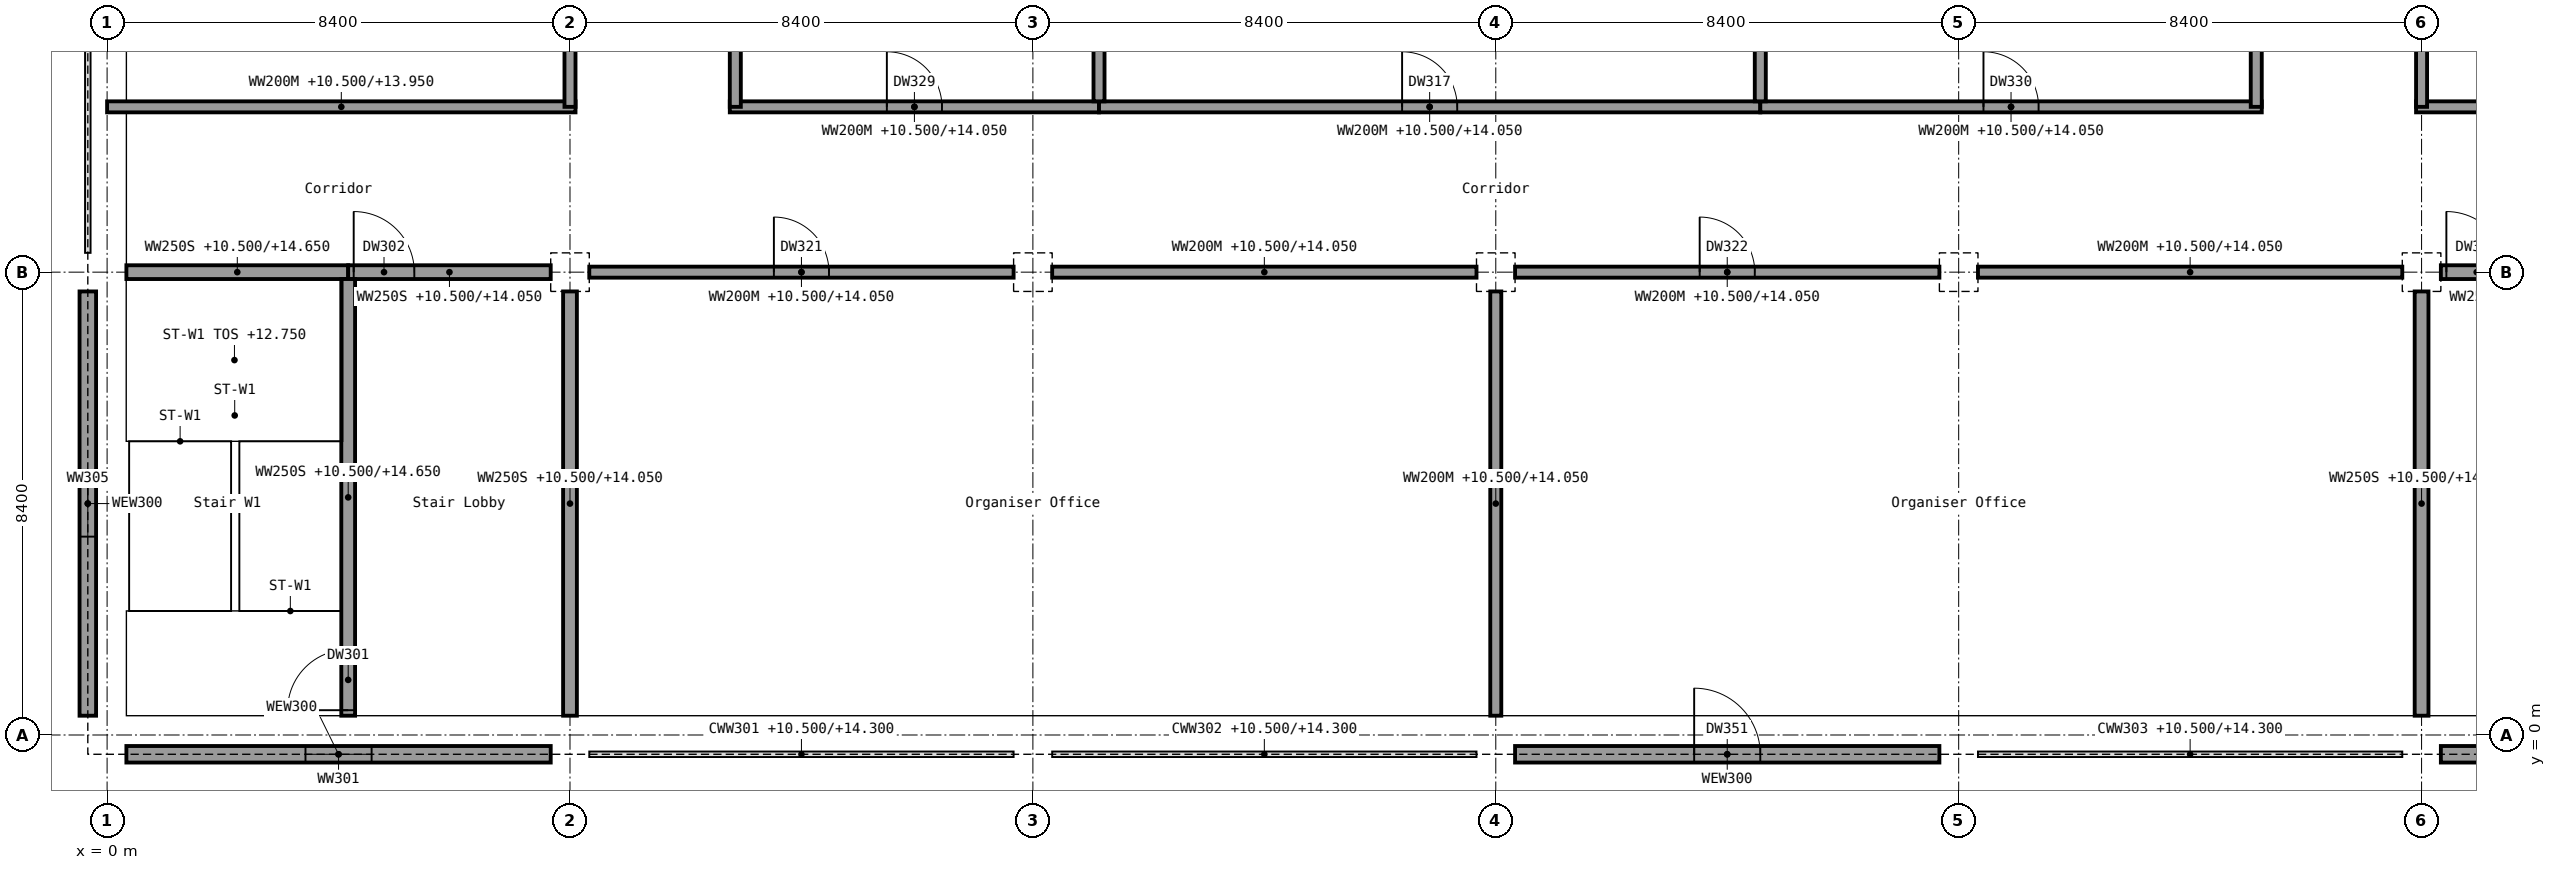
"""IFC4 building model, lengths in metres.
Left out: names, types, materials, properties, quantities, classifications, styles, units other than length and angle.
Written with IfcOpenShell. Run it as: python <this file> out.ifc"""

import sys

from ifc_helpers import new_model, si_unit, direction, frame, frame_2d, origin, origin_2d, place, context, subcontext, project, spatial, rectangle, extrude, element, fill, save


model = new_model("IFC4")
c1 = context("Model", 3, precision=1e-05, world=origin(), true_north=direction((0.0, 1.0)))
c2 = subcontext(c1, "Body", "Model", "MODEL_VIEW")
j1 = project(units=[si_unit("LENGTHUNIT", "METRE"), si_unit("PLANEANGLEUNIT", "RADIAN")], contexts=[c1])
p1 = place(None, origin())
s1 = spatial("IfcSite", under=j1, at=p1, CompositionType="ELEMENT")
p2 = place(p1, origin())
s2 = spatial("IfcBuilding", under=s1, at=p2, CompositionType="ELEMENT")
p3 = place(p2, frame((0.0, 0.0, 10.5)))
s3 = spatial("IfcBuildingStorey", under=s2, at=p3, CompositionType="ELEMENT", Elevation=10.5)
for number, where, z_axis, x_axis in (
    (1, (0.0, 0.0, 0.0), (0.0, 0.0, 1.0), (1.0, 0.0, 0.0)),
    (2, (0.0, 8.4, 0.0), (0.0, 0.0, 1.0), (1.0, 0.0, 0.0)),
    (3, (8.4, 0.0, 0.0), (0.0, 0.0, 1.0), (1.0, 0.0, 0.0)),
    (4, (8.4, 8.4, 0.0), (0.0, 0.0, 1.0), (1.0, 0.0, 0.0)),
    (5, (16.8, 0.0, 0.0), (0.0, 0.0, 1.0), (1.0, 0.0, 0.0)),
    (6, (16.8, 8.4, 0.0), (0.0, 0.0, 1.0), (1.0, 0.0, 0.0)),
    (7, (25.2, 0.0, 0.0), (0.0, 0.0, 1.0), (1.0, 0.0, 0.0)),
    (8, (25.2, 8.4, 0.0), (0.0, 0.0, 1.0), (1.0, 0.0, 0.0)),
    (9, (33.6, 0.0, 0.0), (0.0, 0.0, 1.0), (1.0, 0.0, 0.0)),
    (10, (33.6, 8.4, 0.0), (0.0, 0.0, 1.0), (1.0, 0.0, 0.0)),
    (11, (42.0, 0.0, 0.0), (0.0, 0.0, 1.0), (1.0, 0.0, 0.0)),
    (12, (42.0, 8.4, 0.0), (0.0, 0.0, 1.0), (1.0, 0.0, 0.0)),
):
    element("IfcColumn", number, at=place(p3, frame(where, z_axis=z_axis, x_axis=x_axis)), inside=s3, PredefinedType="COLUMN", context=c2, shape_type="SweptSolid", body=[
        extrude(rectangle(XDim=0.7, YDim=0.7, at=origin_2d()), origin(), (0.0, 0.0, 1.0), 4.5),
    ])
p4 = place(p3, frame((0.35, -0.35, 0.0), z_axis=(0.0, 0.0, 1.0), x_axis=(1.0, 0.0, 0.0)))
e13 = element("IfcWall", 13, at=p4, inside=s3, PredefinedType="SOLIDWALL", context=c2, shape_type="SweptSolid", body=[
    extrude(rectangle(XDim=7.7, YDim=0.3, at=frame_2d((3.85, 0.0))), origin(), (0.0, 0.0, 1.0), 3.8),
])
p5 = place(p4, frame((3.25, 0.0, 1.0)))
e14 = element("IfcOpeningElement", 14, at=p5, cuts=e13, PredefinedType="OPENING", context=c2, shape_type="SweptSolid", body=[
    extrude(rectangle(XDim=1.2, YDim=1.5, at=frame_2d((0.6, 0.75))), frame((0.0, 0.15, 0.0), z_axis=(0.0, -1.0, 0.0), x_axis=(1.0, 0.0, 0.0)), (0.0, 0.0, 1.0), 0.3),
])
p6 = place(p3, frame((25.55, -0.35, 0.0), z_axis=(0.0, 0.0, 1.0), x_axis=(1.0, 0.0, 0.0)))
e15 = element("IfcWall", 15, at=p6, inside=s3, PredefinedType="SOLIDWALL", context=c2, shape_type="SweptSolid", body=[
    extrude(rectangle(XDim=7.7, YDim=0.3, at=frame_2d((3.85, 0.0))), origin(), (0.0, 0.0, 1.0), 3.8),
])
p7 = place(p6, frame((3.25, 0.0, 0.0)))
e16 = element("IfcOpeningElement", 16, at=p7, cuts=e15, PredefinedType="OPENING", context=c2, shape_type="SweptSolid", body=[
    extrude(rectangle(XDim=1.2, YDim=2.1, at=frame_2d((0.6, 1.05))), frame((0.0, 0.15, 0.0), z_axis=(0.0, -1.0, 0.0), x_axis=(1.0, 0.0, 0.0)), (0.0, 0.0, 1.0), 0.3),
])
p8 = place(p3, frame((42.35, -0.35, 0.0), z_axis=(0.0, 0.0, 1.0), x_axis=(1.0, 0.0, 0.0)))
e17 = element("IfcWall", 17, at=p8, inside=s3, PredefinedType="SOLIDWALL", context=c2, shape_type="SweptSolid", body=[
    extrude(rectangle(XDim=7.7, YDim=0.3, at=frame_2d((3.85, 0.0))), origin(), (0.0, 0.0, 1.0), 3.8),
])
p9 = place(p8, frame((3.25, 0.0, 1.0)))
e18 = element("IfcOpeningElement", 18, at=p9, cuts=e17, PredefinedType="OPENING", context=c2, shape_type="SweptSolid", body=[
    extrude(rectangle(XDim=1.2, YDim=1.5, at=frame_2d((0.6, 0.75))), frame((0.0, 0.15, 0.0), z_axis=(0.0, -1.0, 0.0), x_axis=(1.0, 0.0, 0.0)), (0.0, 0.0, 1.0), 0.3),
])
p10 = place(p3, frame((-0.35, 0.35, 0.0), z_axis=(0.0, 0.0, 1.0), x_axis=(0.0, 1.0, 0.0)))
e19 = element("IfcWall", 19, at=p10, inside=s3, PredefinedType="SOLIDWALL", context=c2, shape_type="SweptSolid", body=[
    extrude(rectangle(XDim=7.7, YDim=0.3, at=frame_2d((3.85, 0.0))), origin(), (0.0, 0.0, 1.0), 3.8),
])
p11 = place(p10, frame((3.25, 0.0, 1.0)))
e20 = element("IfcOpeningElement", 20, at=p11, cuts=e19, PredefinedType="OPENING", context=c2, shape_type="SweptSolid", body=[
    extrude(rectangle(XDim=1.2, YDim=1.5, at=frame_2d((0.6, 0.75))), frame((0.0, 0.15, 0.0), z_axis=(0.0, -1.0, 0.0), x_axis=(1.0, 0.0, 0.0)), (0.0, 0.0, 1.0), 0.3),
])
p12 = place(p3, frame((0.35, 8.4, 0.0), z_axis=(0.0, 0.0, 1.0), x_axis=(1.0, 0.0, 0.0)))
e21 = element("IfcWall", 21, at=p12, inside=s3, PredefinedType="SHEAR", context=c2, shape_type="SweptSolid", body=[
    extrude(rectangle(XDim=4.025, YDim=0.25, at=frame_2d((2.012, 0.0))), origin(), (0.0, 0.0, 1.0), 4.15),
])
p13 = place(p3, frame((4.375, 8.4, 0.0), z_axis=(0.0, 0.0, 1.0), x_axis=(1.0, 0.0, 0.0)))
e22 = element("IfcWall", 22, at=p13, inside=s3, PredefinedType="SHEAR", context=c2, shape_type="SweptSolid", body=[
    extrude(rectangle(XDim=3.675, YDim=0.25, at=frame_2d((1.837, 0.0))), origin(), (0.0, 0.0, 1.0), 3.55),
])
p14 = place(p13, frame((0.1, 0.0, 0.0)))
e23 = element("IfcOpeningElement", 23, at=p14, cuts=e22, PredefinedType="OPENING", context=c2, shape_type="SweptSolid", body=[
    extrude(rectangle(XDim=1.1, YDim=2.1, at=frame_2d((0.55, 1.05))), frame((0.0, 0.125, 0.0), z_axis=(0.0, -1.0, 0.0), x_axis=(1.0, 0.0, 0.0)), (0.0, 0.0, 1.0), 0.25),
])
p15 = place(p3, frame((8.75, 8.4, 0.0), z_axis=(0.0, 0.0, 1.0), x_axis=(1.0, 0.0, 0.0)))
e24 = element("IfcWall", 24, at=p15, inside=s3, PredefinedType="PARTITIONING", context=c2, shape_type="SweptSolid", body=[
    extrude(rectangle(XDim=7.7, YDim=0.2, at=frame_2d((3.85, 0.0))), origin(), (0.0, 0.0, 1.0), 3.55),
])
p16 = place(p15, frame((3.35, 0.0, 0.0)))
e25 = element("IfcOpeningElement", 25, at=p16, cuts=e24, PredefinedType="OPENING", context=c2, shape_type="SweptSolid", body=[
    extrude(rectangle(XDim=1.0, YDim=2.1, at=frame_2d((0.5, 1.05))), frame((0.0, 0.1, 0.0), z_axis=(0.0, -1.0, 0.0), x_axis=(1.0, 0.0, 0.0)), (0.0, 0.0, 1.0), 0.2),
])
p17 = place(p3, frame((17.15, 8.4, 0.0), z_axis=(0.0, 0.0, 1.0), x_axis=(1.0, 0.0, 0.0)))
e26 = element("IfcWall", 26, at=p17, inside=s3, PredefinedType="PARTITIONING", context=c2, shape_type="SweptSolid", body=[
    extrude(rectangle(XDim=7.7, YDim=0.2, at=frame_2d((3.85, 0.0))), origin(), (0.0, 0.0, 1.0), 3.55),
])
p18 = place(p3, frame((25.55, 8.4, 0.0), z_axis=(0.0, 0.0, 1.0), x_axis=(1.0, 0.0, 0.0)))
e27 = element("IfcWall", 27, at=p18, inside=s3, PredefinedType="PARTITIONING", context=c2, shape_type="SweptSolid", body=[
    extrude(rectangle(XDim=7.7, YDim=0.2, at=frame_2d((3.85, 0.0))), origin(), (0.0, 0.0, 1.0), 3.55),
])
p19 = place(p18, frame((3.35, 0.0, 0.0)))
e28 = element("IfcOpeningElement", 28, at=p19, cuts=e27, PredefinedType="OPENING", context=c2, shape_type="SweptSolid", body=[
    extrude(rectangle(XDim=1.0, YDim=2.1, at=frame_2d((0.5, 1.05))), frame((0.0, 0.1, 0.0), z_axis=(0.0, -1.0, 0.0), x_axis=(1.0, 0.0, 0.0)), (0.0, 0.0, 1.0), 0.2),
])
p20 = place(p3, frame((33.95, 8.4, 0.0), z_axis=(0.0, 0.0, 1.0), x_axis=(1.0, 0.0, 0.0)))
e29 = element("IfcWall", 29, at=p20, inside=s3, PredefinedType="PARTITIONING", context=c2, shape_type="SweptSolid", body=[
    extrude(rectangle(XDim=7.7, YDim=0.2, at=frame_2d((3.85, 0.0))), origin(), (0.0, 0.0, 1.0), 3.55),
])
p21 = place(p3, frame((42.35, 8.4, 0.0), z_axis=(0.0, 0.0, 1.0), x_axis=(1.0, 0.0, 0.0)))
e30 = element("IfcWall", 30, at=p21, inside=s3, PredefinedType="SHEAR", context=c2, shape_type="SweptSolid", body=[
    extrude(rectangle(XDim=3.675, YDim=0.25, at=frame_2d((1.837, 0.0))), origin(), (0.0, 0.0, 1.0), 3.55),
])
p22 = place(p21, frame((0.1, 0.0, 0.0)))
e31 = element("IfcOpeningElement", 31, at=p22, cuts=e30, PredefinedType="OPENING", context=c2, shape_type="SweptSolid", body=[
    extrude(rectangle(XDim=1.1, YDim=2.1, at=frame_2d((0.55, 1.05))), frame((0.0, 0.125, 0.0), z_axis=(0.0, -1.0, 0.0), x_axis=(1.0, 0.0, 0.0)), (0.0, 0.0, 1.0), 0.25),
])
p23 = place(p3, frame((0.0, 11.4, 0.0), z_axis=(0.0, 0.0, 1.0), x_axis=(1.0, 0.0, 0.0)))
e32 = element("IfcWall", 32, at=p23, inside=s3, PredefinedType="PARTITIONING", context=c2, shape_type="SweptSolid", body=[
    extrude(rectangle(XDim=8.5, YDim=0.2, at=frame_2d((4.25, 0.0))), origin(), (0.0, 0.0, 1.0), 3.45),
])
p24 = place(p3, frame((11.3, 11.4, 0.0), z_axis=(0.0, 0.0, 1.0), x_axis=(1.0, 0.0, 0.0)))
e33 = element("IfcWall", 33, at=p24, inside=s3, PredefinedType="PARTITIONING", context=c2, shape_type="SweptSolid", body=[
    extrude(rectangle(XDim=6.7, YDim=0.2, at=frame_2d((3.35, 0.0))), origin(), (0.0, 0.0, 1.0), 3.55),
])
p25 = place(p24, frame((2.85, 0.0, 0.0)))
e34 = element("IfcOpeningElement", 34, at=p25, cuts=e33, PredefinedType="OPENING", context=c2, shape_type="SweptSolid", body=[
    extrude(rectangle(XDim=1.0, YDim=2.1, at=frame_2d((0.5, 1.05))), frame((0.0, 0.1, 0.0), z_axis=(0.0, -1.0, 0.0), x_axis=(1.0, 0.0, 0.0)), (0.0, 0.0, 1.0), 0.2),
])
p26 = place(p3, frame((18.0, 11.4, 0.0), z_axis=(0.0, 0.0, 1.0), x_axis=(1.0, 0.0, 0.0)))
e35 = element("IfcWall", 35, at=p26, inside=s3, PredefinedType="PARTITIONING", context=c2, shape_type="SweptSolid", body=[
    extrude(rectangle(XDim=12.0, YDim=0.2, at=frame_2d((6.0, 0.0))), origin(), (0.0, 0.0, 1.0), 3.55),
])
p27 = place(p26, frame((5.5, 0.0, 0.0)))
e36 = element("IfcOpeningElement", 36, at=p27, cuts=e35, PredefinedType="OPENING", context=c2, shape_type="SweptSolid", body=[
    extrude(rectangle(XDim=1.0, YDim=2.1, at=frame_2d((0.5, 1.05))), frame((0.0, 0.1, 0.0), z_axis=(0.0, -1.0, 0.0), x_axis=(1.0, 0.0, 0.0)), (0.0, 0.0, 1.0), 0.2),
])
p28 = place(p3, frame((30.0, 11.4, 0.0), z_axis=(0.0, 0.0, 1.0), x_axis=(1.0, 0.0, 0.0)))
e37 = element("IfcWall", 37, at=p28, inside=s3, PredefinedType="PARTITIONING", context=c2, shape_type="SweptSolid", body=[
    extrude(rectangle(XDim=9.1, YDim=0.2, at=frame_2d((4.55, 0.0))), origin(), (0.0, 0.0, 1.0), 3.55),
])
p29 = place(p28, frame((4.05, 0.0, 0.0)))
e38 = element("IfcOpeningElement", 38, at=p29, cuts=e37, PredefinedType="OPENING", context=c2, shape_type="SweptSolid", body=[
    extrude(rectangle(XDim=1.0, YDim=2.1, at=frame_2d((0.5, 1.05))), frame((0.0, 0.1, 0.0), z_axis=(0.0, -1.0, 0.0), x_axis=(1.0, 0.0, 0.0)), (0.0, 0.0, 1.0), 0.2),
])
p30 = place(p3, frame((41.9, 11.4, 0.0), z_axis=(0.0, 0.0, 1.0), x_axis=(1.0, 0.0, 0.0)))
e39 = element("IfcWall", 39, at=p30, inside=s3, PredefinedType="PARTITIONING", context=c2, shape_type="SweptSolid", body=[
    extrude(rectangle(XDim=8.5, YDim=0.2, at=frame_2d((4.25, 0.0))), origin(), (0.0, 0.0, 1.0), 3.45),
])
p31 = place(p3, frame((4.375, 0.35, 0.0), z_axis=(0.0, 0.0, 1.0), x_axis=(0.0, 1.0, 0.0)))
e40 = element("IfcWall", 40, at=p31, inside=s3, PredefinedType="SHEAR", context=c2, shape_type="SweptSolid", body=[
    extrude(rectangle(XDim=7.925, YDim=0.25, at=frame_2d((3.962, 0.0))), origin(), (0.0, 0.0, 1.0), 4.15),
])
p32 = place(p31, frame((0.1, 0.0, 0.0)))
e41 = element("IfcOpeningElement", 41, at=p32, cuts=e40, PredefinedType="OPENING", context=c2, shape_type="SweptSolid", body=[
    extrude(rectangle(XDim=1.1, YDim=2.1, at=frame_2d((0.55, 1.05))), frame((0.0, 0.125, 0.0), z_axis=(0.0, -1.0, 0.0), x_axis=(1.0, 0.0, 0.0)), (0.0, 0.0, 1.0), 0.25),
])
p33 = place(p3, frame((8.4, 0.35, 0.0), z_axis=(0.0, 0.0, 1.0), x_axis=(0.0, 1.0, 0.0)))
e42 = element("IfcWall", 42, at=p33, inside=s3, PredefinedType="SHEAR", context=c2, shape_type="SweptSolid", body=[
    extrude(rectangle(XDim=7.7, YDim=0.25, at=frame_2d((3.85, 0.0))), origin(), (0.0, 0.0, 1.0), 3.55),
])
p34 = place(p3, frame((8.4, 11.4, 0.0), z_axis=(0.0, 0.0, 1.0), x_axis=(0.0, 1.0, 0.0)))
e43 = element("IfcWall", 43, at=p34, inside=s3, PredefinedType="PARTITIONING", context=c2, shape_type="SweptSolid", body=[
    extrude(rectangle(XDim=5.05, YDim=0.2, at=frame_2d((2.525, 0.0))), origin(), (0.0, 0.0, 1.0), 3.55),
])
p35 = place(p3, frame((11.4, 11.4, 0.0), z_axis=(0.0, 0.0, 1.0), x_axis=(0.0, 1.0, 0.0)))
e44 = element("IfcWall", 44, at=p35, inside=s3, PredefinedType="PARTITIONING", context=c2, shape_type="SweptSolid", body=[
    extrude(rectangle(XDim=5.4, YDim=0.2, at=frame_2d((2.7, 0.0))), origin(), (0.0, 0.0, 1.0), 3.55),
])
p36 = place(p3, frame((18.0, 11.5, 0.0), z_axis=(0.0, 0.0, 1.0), x_axis=(0.0, 1.0, 0.0)))
e45 = element("IfcWall", 45, at=p36, inside=s3, PredefinedType="PARTITIONING", context=c2, shape_type="SweptSolid", body=[
    extrude(rectangle(XDim=5.175, YDim=0.2, at=frame_2d((2.587, 0.0))), origin(), (0.0, 0.0, 1.0), 4.15),
])
p37 = place(p3, frame((25.2, 0.35, 0.0), z_axis=(0.0, 0.0, 1.0), x_axis=(0.0, 1.0, 0.0)))
e46 = element("IfcWall", 46, at=p37, inside=s3, PredefinedType="PARTITIONING", context=c2, shape_type="SweptSolid", body=[
    extrude(rectangle(XDim=7.7, YDim=0.2, at=frame_2d((3.85, 0.0))), origin(), (0.0, 0.0, 1.0), 3.55),
])
p38 = place(p3, frame((30.0, 11.5, 0.0), z_axis=(0.0, 0.0, 1.0), x_axis=(0.0, 1.0, 0.0)))
e47 = element("IfcWall", 47, at=p38, inside=s3, PredefinedType="PARTITIONING", context=c2, shape_type="SweptSolid", body=[
    extrude(rectangle(XDim=5.15, YDim=0.2, at=frame_2d((2.575, 0.0))), origin(), (0.0, 0.0, 1.0), 4.15),
])
p39 = place(p3, frame((39.0, 11.4, 0.0), z_axis=(0.0, 0.0, 1.0), x_axis=(0.0, 1.0, 0.0)))
e48 = element("IfcWall", 48, at=p39, inside=s3, PredefinedType="PARTITIONING", context=c2, shape_type="SweptSolid", body=[
    extrude(rectangle(XDim=5.4, YDim=0.2, at=frame_2d((2.7, 0.0))), origin(), (0.0, 0.0, 1.0), 3.55),
])
p40 = place(p3, frame((42.0, 0.35, 0.0), z_axis=(0.0, 0.0, 1.0), x_axis=(0.0, 1.0, 0.0)))
e49 = element("IfcWall", 49, at=p40, inside=s3, PredefinedType="SHEAR", context=c2, shape_type="SweptSolid", body=[
    extrude(rectangle(XDim=7.7, YDim=0.25, at=frame_2d((3.85, 0.0))), origin(), (0.0, 0.0, 1.0), 3.55),
])
p41 = place(p3, frame((42.0, 11.4, 0.0), z_axis=(0.0, 0.0, 1.0), x_axis=(0.0, 1.0, 0.0)))
e50 = element("IfcWall", 50, at=p41, inside=s3, PredefinedType="PARTITIONING", context=c2, shape_type="SweptSolid", body=[
    extrude(rectangle(XDim=5.05, YDim=0.2, at=frame_2d((2.525, 0.0))), origin(), (0.0, 0.0, 1.0), 3.55),
])
p42 = place(p41, frame((2.025, 0.0, 0.0)))
e51 = element("IfcOpeningElement", 51, at=p42, cuts=e50, PredefinedType="OPENING", context=c2, shape_type="SweptSolid", body=[
    extrude(rectangle(XDim=1.0, YDim=2.1, at=frame_2d((0.5, 1.05))), frame((0.0, 0.1, 0.0), z_axis=(0.0, -1.0, 0.0), x_axis=(1.0, 0.0, 0.0)), (0.0, 0.0, 1.0), 0.2),
])
p43 = place(p5, origin())
e52 = element("IfcWindow", 52, at=p43, inside=s3, PartitioningType="SINGLE_PANEL", PredefinedType="WINDOW", context=c2, shape_type="SweptSolid", body=[
    extrude(rectangle(XDim=1.2, YDim=1.5, at=frame_2d((0.6, 0.75))), frame((0.0, 0.03, 0.0), z_axis=(0.0, -1.0, 0.0), x_axis=(1.0, 0.0, 0.0)), (0.0, 0.0, 1.0), 0.06),
])
fill(e14, e52)
p44 = place(p7, origin())
e53 = element("IfcDoor", 53, at=p44, inside=s3, OperationType="SINGLE_SWING_LEFT", PredefinedType="DOOR", context=c2, shape_type="SweptSolid", body=[
    extrude(rectangle(XDim=1.2, YDim=2.1, at=frame_2d((0.6, 1.05))), frame((0.0, 0.025, 0.0), z_axis=(0.0, -1.0, 0.0), x_axis=(1.0, 0.0, 0.0)), (0.0, 0.0, 1.0), 0.05),
])
fill(e16, e53)
p45 = place(p11, origin())
e54 = element("IfcWindow", 54, at=p45, inside=s3, PartitioningType="SINGLE_PANEL", PredefinedType="WINDOW", context=c2, shape_type="SweptSolid", body=[
    extrude(rectangle(XDim=1.2, YDim=1.5, at=frame_2d((0.6, 0.75))), frame((0.0, 0.03, 0.0), z_axis=(0.0, -1.0, 0.0), x_axis=(1.0, 0.0, 0.0)), (0.0, 0.0, 1.0), 0.06),
])
fill(e20, e54)
p46 = place(p32, origin())
e55 = element("IfcDoor", 55, at=p46, inside=s3, OperationType="SINGLE_SWING_LEFT", PredefinedType="DOOR", context=c2, shape_type="SweptSolid", body=[
    extrude(rectangle(XDim=1.1, YDim=2.1, at=frame_2d((0.55, 1.05))), frame((0.0, 0.025, 0.0), z_axis=(0.0, -1.0, 0.0), x_axis=(1.0, 0.0, 0.0)), (0.0, 0.0, 1.0), 0.05),
])
fill(e41, e55)
p47 = place(p14, origin())
e56 = element("IfcDoor", 56, at=p47, inside=s3, OperationType="SINGLE_SWING_LEFT", PredefinedType="DOOR", context=c2, shape_type="SweptSolid", body=[
    extrude(rectangle(XDim=1.1, YDim=2.1, at=frame_2d((0.55, 1.05))), frame((0.0, 0.025, 0.0), z_axis=(0.0, -1.0, 0.0), x_axis=(1.0, 0.0, 0.0)), (0.0, 0.0, 1.0), 0.05),
])
fill(e23, e56)
p48 = place(p22, origin())
e57 = element("IfcDoor", 57, at=p48, inside=s3, OperationType="SINGLE_SWING_LEFT", PredefinedType="DOOR", context=c2, shape_type="SweptSolid", body=[
    extrude(rectangle(XDim=1.1, YDim=2.1, at=frame_2d((0.55, 1.05))), frame((0.0, 0.025, 0.0), z_axis=(0.0, -1.0, 0.0), x_axis=(1.0, 0.0, 0.0)), (0.0, 0.0, 1.0), 0.05),
])
fill(e31, e57)
p49 = place(p27, origin())
e58 = element("IfcDoor", 58, at=p49, inside=s3, OperationType="SINGLE_SWING_LEFT", PredefinedType="DOOR", context=c2, shape_type="SweptSolid", body=[
    extrude(rectangle(XDim=1.0, YDim=2.1, at=frame_2d((0.5, 1.05))), frame((0.0, 0.025, 0.0), z_axis=(0.0, -1.0, 0.0), x_axis=(1.0, 0.0, 0.0)), (0.0, 0.0, 1.0), 0.05),
])
fill(e36, e58)
p50 = place(p16, origin())
e59 = element("IfcDoor", 59, at=p50, inside=s3, OperationType="SINGLE_SWING_LEFT", PredefinedType="DOOR", context=c2, shape_type="SweptSolid", body=[
    extrude(rectangle(XDim=1.0, YDim=2.1, at=frame_2d((0.5, 1.05))), frame((0.0, 0.025, 0.0), z_axis=(0.0, -1.0, 0.0), x_axis=(1.0, 0.0, 0.0)), (0.0, 0.0, 1.0), 0.05),
])
fill(e25, e59)
p51 = place(p19, origin())
e60 = element("IfcDoor", 60, at=p51, inside=s3, OperationType="SINGLE_SWING_LEFT", PredefinedType="DOOR", context=c2, shape_type="SweptSolid", body=[
    extrude(rectangle(XDim=1.0, YDim=2.1, at=frame_2d((0.5, 1.05))), frame((0.0, 0.025, 0.0), z_axis=(0.0, -1.0, 0.0), x_axis=(1.0, 0.0, 0.0)), (0.0, 0.0, 1.0), 0.05),
])
fill(e28, e60)
p52 = place(p25, origin())
e61 = element("IfcDoor", 61, at=p52, inside=s3, OperationType="SINGLE_SWING_LEFT", PredefinedType="DOOR", context=c2, shape_type="SweptSolid", body=[
    extrude(rectangle(XDim=1.0, YDim=2.1, at=frame_2d((0.5, 1.05))), frame((0.0, 0.025, 0.0), z_axis=(0.0, -1.0, 0.0), x_axis=(1.0, 0.0, 0.0)), (0.0, 0.0, 1.0), 0.05),
])
fill(e34, e61)
p53 = place(p29, origin())
e62 = element("IfcDoor", 62, at=p53, inside=s3, OperationType="SINGLE_SWING_LEFT", PredefinedType="DOOR", context=c2, shape_type="SweptSolid", body=[
    extrude(rectangle(XDim=1.0, YDim=2.1, at=frame_2d((0.5, 1.05))), frame((0.0, 0.025, 0.0), z_axis=(0.0, -1.0, 0.0), x_axis=(1.0, 0.0, 0.0)), (0.0, 0.0, 1.0), 0.05),
])
fill(e38, e62)
save(model, sys.argv[1])
